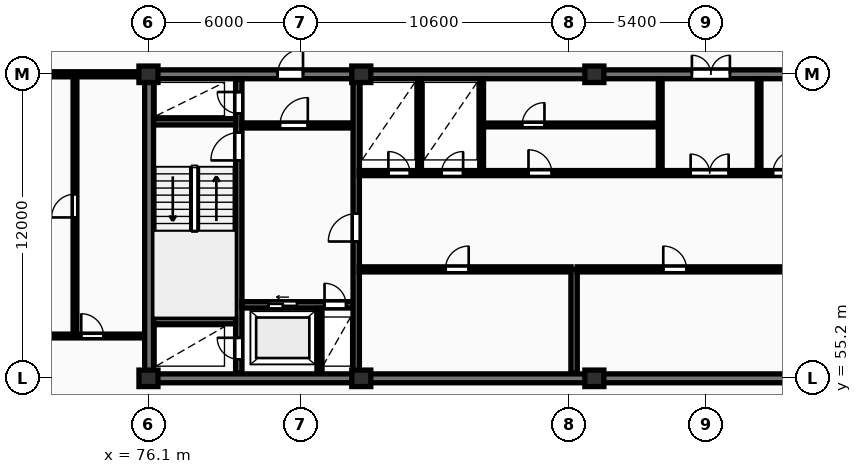
"""IFC4 building model, lengths in metres.
Left out: names, types, materials, properties, quantities, classifications, styles, units other than length and angle.
Written with IfcOpenShell. Run it as: python <this file> out.ifc"""

import sys

from ifc_helpers import new_model, si_unit, direction, frame, frame_2d, origin, origin_2d, place, context, subcontext, project, spatial, rectangle, extrude, element, fill, save


model = new_model("IFC4")
c1 = context("Model", 3, precision=1e-05, world=origin(), true_north=direction((0.0, 1.0)))
c2 = subcontext(c1, "Body", "Model", "MODEL_VIEW")
j1 = project(units=[si_unit("LENGTHUNIT", "METRE"), si_unit("PLANEANGLEUNIT", "RADIAN")], contexts=[c1])
p1 = place(None, origin())
s1 = spatial("IfcSite", under=j1, at=p1, CompositionType="ELEMENT")
p2 = place(p1, origin())
s2 = spatial("IfcBuilding", under=s1, at=p2, CompositionType="ELEMENT")
p3 = place(p2, frame((0.0, 0.0, 235.55)))
s3 = spatial("IfcBuildingStorey", under=s2, at=p3, CompositionType="ELEMENT", Elevation=235.55)
for number, where, z_axis, x_axis in (
    (1, (76.1, 55.2, 0.0), (0.0, 0.0, 1.0), (1.0, 0.0, 0.0)),
    (2, (76.1, 67.2, 0.0), (0.0, 0.0, 1.0), (1.0, 0.0, 0.0)),
    (3, (84.5, 55.2, 0.0), (0.0, 0.0, 1.0), (1.0, 0.0, 0.0)),
    (4, (84.5, 67.2, 0.0), (0.0, 0.0, 1.0), (1.0, 0.0, 0.0)),
    (5, (93.7, 55.2, 0.0), (0.0, 0.0, 1.0), (1.0, 0.0, 0.0)),
    (6, (93.7, 67.2, 0.0), (0.0, 0.0, 1.0), (1.0, 0.0, 0.0)),
):
    element("IfcColumn", number, at=place(p3, frame(where, z_axis=z_axis, x_axis=x_axis)), inside=s3, PredefinedType="COLUMN", context=c2, shape_type="SweptSolid", body=[
        extrude(rectangle(XDim=0.75, YDim=0.65, at=origin_2d()), origin(), (0.0, 0.0, 1.0), 3.45),
    ])
p4 = place(p3, frame((75.95, 55.2, 0.0), z_axis=(0.0, 0.0, 1.0), x_axis=(1.0, 0.0, 0.0)))
e7 = element("IfcWall", 7, at=p4, inside=s3, PredefinedType="SHEAR", context=c2, shape_type="SweptSolid", body=[
    extrude(rectangle(XDim=36.3, YDim=0.35, at=frame_2d((18.15, 0.0))), origin(), (0.0, 0.0, 1.0), 3.45),
])
p5 = place(p3, frame((76.125, 55.375, 0.0), z_axis=(0.0, 0.0, 1.0), x_axis=(0.0, 1.0, 0.0)))
e8 = element("IfcWall", 8, at=p5, inside=s3, PredefinedType="SHEAR", context=c2, shape_type="SweptSolid", body=[
    extrude(rectangle(XDim=11.65, YDim=0.35, at=frame_2d((5.825, 0.0))), origin(), (0.0, 0.0, 1.0), 3.45),
])
p6 = place(p3, frame((75.95, 67.2, 0.0), z_axis=(0.0, 0.0, 1.0), x_axis=(1.0, 0.0, 0.0)))
e9 = element("IfcWall", 9, at=p6, inside=s3, PredefinedType="SHEAR", context=c2, shape_type="SweptSolid", body=[
    extrude(rectangle(XDim=36.3, YDim=0.35, at=frame_2d((18.15, 0.0))), origin(), (0.0, 0.0, 1.0), 3.45),
])
p7 = place(p6, frame((5.25, 0.0, 0.0)))
e10 = element("IfcOpeningElement", 10, at=p7, cuts=e9, PredefinedType="OPENING", context=c2, shape_type="SweptSolid", body=[
    extrude(rectangle(XDim=1.0, YDim=2.15, at=frame_2d((0.5, 1.075))), frame((0.0, 0.185, 0.0), z_axis=(0.0, -1.0, 0.0), x_axis=(1.0, 0.0, 0.0)), (0.0, 0.0, 1.0), 0.37),
])
p8 = place(p6, frame((21.6, 0.0, 0.0)))
e11 = element("IfcOpeningElement", 11, at=p8, cuts=e9, PredefinedType="OPENING", context=c2, shape_type="SweptSolid", body=[
    extrude(rectangle(XDim=1.5, YDim=2.2, at=frame_2d((0.75, 1.1))), frame((0.0, 0.185, 0.0), z_axis=(0.0, -1.0, 0.0), x_axis=(1.0, 0.0, 0.0)), (0.0, 0.0, 1.0), 0.37),
])
p9 = place(p6, frame((30.45, 0.0, 0.0)))
e12 = element("IfcOpeningElement", 12, at=p9, cuts=e9, PredefinedType="OPENING", context=c2, shape_type="SweptSolid", body=[
    extrude(rectangle(XDim=1.0, YDim=2.15, at=frame_2d((0.5, 1.075))), frame((0.0, 0.185, 0.0), z_axis=(0.0, -1.0, 0.0), x_axis=(1.0, 0.0, 0.0)), (0.0, 0.0, 1.0), 0.37),
])
p10 = place(p3, frame((79.665, 55.4, 0.0), z_axis=(0.0, 0.0, 1.0), x_axis=(0.0, 1.0, 0.0)))
e13 = element("IfcWall", 13, at=p10, inside=s3, PredefinedType="SHEAR", context=c2, shape_type="SweptSolid", body=[
    extrude(rectangle(XDim=11.6, YDim=0.25, at=frame_2d((5.8, 0.0))), origin(), (0.0, 0.0, 1.0), 3.45),
])
p11 = place(p10, frame((0.55, 0.0, 0.0)))
e14 = element("IfcOpeningElement", 14, at=p11, cuts=e13, PredefinedType="OPENING", context=c2, shape_type="SweptSolid", body=[
    extrude(rectangle(XDim=0.85, YDim=2.05, at=frame_2d((0.425, 1.025))), frame((0.0, 0.135, 0.0), z_axis=(0.0, -1.0, 0.0), x_axis=(1.0, 0.0, 0.0)), (0.0, 0.0, 1.0), 0.27),
])
p12 = place(p10, frame((8.4, 0.0, 0.0)))
e15 = element("IfcOpeningElement", 15, at=p12, cuts=e13, PredefinedType="OPENING", context=c2, shape_type="SweptSolid", body=[
    extrude(rectangle(XDim=1.1, YDim=2.1, at=frame_2d((0.55, 1.05))), frame((0.0, 0.135, 0.0), z_axis=(0.0, -1.0, 0.0), x_axis=(1.0, 0.0, 0.0)), (0.0, 0.0, 1.0), 0.27),
])
p13 = place(p10, frame((10.25, 0.0, 0.0)))
e16 = element("IfcOpeningElement", 16, at=p13, cuts=e13, PredefinedType="OPENING", context=c2, shape_type="SweptSolid", body=[
    extrude(rectangle(XDim=0.85, YDim=2.05, at=frame_2d((0.425, 1.025))), frame((0.0, 0.135, 0.0), z_axis=(0.0, -1.0, 0.0), x_axis=(1.0, 0.0, 0.0)), (0.0, 0.0, 1.0), 0.27),
])
for number, where, z_axis, x_axis in (
    (17, (76.3, 57.475, 0.0), (0.0, 0.0, 1.0), (1.0, 0.0, 0.0)),
    (18, (76.3, 65.325, 0.0), (0.0, 0.0, 1.0), (1.0, 0.0, 0.0)),
):
    element("IfcWall", number, at=place(p3, frame(where, z_axis=z_axis, x_axis=x_axis)), inside=s3, PredefinedType="SHEAR", context=c2, shape_type="SweptSolid", body=[
        extrude(rectangle(XDim=3.24, YDim=0.25, at=frame_2d((1.62, 0.0))), origin(), (0.0, 0.0, 1.0), 3.45),
    ])
p14 = place(p3, frame((79.79, 58.1, 0.0), z_axis=(0.0, 0.0, 1.0), x_axis=(1.0, 0.0, 0.0)))
e19 = element("IfcWall", 19, at=p14, inside=s3, PredefinedType="SHEAR", context=c2, shape_type="SweptSolid", body=[
    extrude(rectangle(XDim=4.39, YDim=0.25, at=frame_2d((2.195, 0.0))), origin(), (0.0, 0.0, 1.0), 3.45),
])
p15 = place(p14, frame((1.05, 0.0, 0.0)))
e20 = element("IfcOpeningElement", 20, at=p15, cuts=e19, PredefinedType="OPENING", context=c2, shape_type="SweptSolid", body=[
    extrude(rectangle(XDim=1.12, YDim=2.12, at=frame_2d((0.56, 1.06))), frame((0.0, 0.135, 0.0), z_axis=(0.0, -1.0, 0.0), x_axis=(1.0, 0.0, 0.0)), (0.0, 0.0, 1.0), 0.27),
])
p16 = place(p14, frame((3.26, 0.0, 0.0)))
e21 = element("IfcOpeningElement", 21, at=p16, cuts=e19, PredefinedType="OPENING", context=c2, shape_type="SweptSolid", body=[
    extrude(rectangle(XDim=0.85, YDim=2.05, at=frame_2d((0.425, 1.025))), frame((0.0, 0.135, 0.0), z_axis=(0.0, -1.0, 0.0), x_axis=(1.0, 0.0, 0.0)), (0.0, 0.0, 1.0), 0.27),
])
p17 = place(p3, frame((82.85, 55.4, 0.0), z_axis=(0.0, 0.0, 1.0), x_axis=(0.0, 1.0, 0.0)))
e22 = element("IfcWall", 22, at=p17, inside=s3, PredefinedType="PARTITIONING", context=c2, shape_type="SweptSolid", body=[
    extrude(rectangle(XDim=2.56, YDim=0.2, at=frame_2d((1.28, 0.0))), origin(), (0.0, 0.0, 1.0), 3.17),
])
p18 = place(p3, frame((79.79, 65.18, 0.0), z_axis=(0.0, 0.0, 1.0), x_axis=(1.0, 0.0, 0.0)))
e23 = element("IfcWall", 23, at=p18, inside=s3, PredefinedType="PARTITIONING", context=c2, shape_type="SweptSolid", body=[
    extrude(rectangle(XDim=4.39, YDim=0.2, at=frame_2d((2.195, 0.0))), origin(), (0.0, 0.0, 1.0), 3.17),
])
p19 = place(p18, frame((1.5, 0.0, 0.0)))
e24 = element("IfcOpeningElement", 24, at=p19, cuts=e23, PredefinedType="OPENING", context=c2, shape_type="SweptSolid", body=[
    extrude(rectangle(XDim=1.1, YDim=2.1, at=frame_2d((0.55, 1.05))), frame((0.0, 0.11, 0.0), z_axis=(0.0, -1.0, 0.0), x_axis=(1.0, 0.0, 0.0)), (0.0, 0.0, 1.0), 0.22),
])
p20 = place(p3, frame((84.3, 55.4, 0.0), z_axis=(0.0, 0.0, 1.0), x_axis=(0.0, 1.0, 0.0)))
e25 = element("IfcWall", 25, at=p20, inside=s3, PredefinedType="SHEAR", context=c2, shape_type="SweptSolid", body=[
    extrude(rectangle(XDim=11.6, YDim=0.25, at=frame_2d((5.8, 0.0))), origin(), (0.0, 0.0, 1.0), 3.45),
])
p21 = place(p20, frame((5.2, 0.0, 0.0)))
e26 = element("IfcOpeningElement", 26, at=p21, cuts=e25, PredefinedType="OPENING", context=c2, shape_type="SweptSolid", body=[
    extrude(rectangle(XDim=1.1, YDim=2.1, at=frame_2d((0.55, 1.05))), frame((0.0, 0.135, 0.0), z_axis=(0.0, -1.0, 0.0), x_axis=(1.0, 0.0, 0.0)), (0.0, 0.0, 1.0), 0.27),
])
p22 = place(p3, frame((84.42, 59.5, 0.0), z_axis=(0.0, 0.0, 1.0), x_axis=(1.0, 0.0, 0.0)))
e27 = element("IfcWall", 27, at=p22, inside=s3, PredefinedType="PARTITIONING", context=c2, shape_type="SweptSolid", body=[
    extrude(rectangle(XDim=8.36, YDim=0.2, at=frame_2d((4.18, 0.0))), origin(), (0.0, 0.0, 1.0), 3.17),
])
p23 = place(p22, frame((3.4, 0.0, 0.0)))
e28 = element("IfcOpeningElement", 28, at=p23, cuts=e27, PredefinedType="OPENING", context=c2, shape_type="SweptSolid", body=[
    extrude(rectangle(XDim=0.92, YDim=2.08, at=frame_2d((0.46, 1.04))), frame((0.0, 0.11, 0.0), z_axis=(0.0, -1.0, 0.0), x_axis=(1.0, 0.0, 0.0)), (0.0, 0.0, 1.0), 0.22),
])
p24 = place(p3, frame((92.9, 55.4, 0.0), z_axis=(0.0, 0.0, 1.0), x_axis=(0.0, 1.0, 0.0)))
e29 = element("IfcWall", 29, at=p24, inside=s3, PredefinedType="SHEAR", context=c2, shape_type="SweptSolid", body=[
    extrude(rectangle(XDim=4.1, YDim=0.25, at=frame_2d((2.05, 0.0))), origin(), (0.0, 0.0, 1.0), 3.45),
])
p25 = place(p3, frame((93.02, 59.5, 0.0), z_axis=(0.0, 0.0, 1.0), x_axis=(1.0, 0.0, 0.0)))
e30 = element("IfcWall", 30, at=p25, inside=s3, PredefinedType="PARTITIONING", context=c2, shape_type="SweptSolid", body=[
    extrude(rectangle(XDim=8.36, YDim=0.2, at=frame_2d((4.18, 0.0))), origin(), (0.0, 0.0, 1.0), 3.17),
])
p26 = place(p25, frame((3.4, 0.0, 0.0)))
e31 = element("IfcOpeningElement", 31, at=p26, cuts=e30, PredefinedType="OPENING", context=c2, shape_type="SweptSolid", body=[
    extrude(rectangle(XDim=0.92, YDim=2.08, at=frame_2d((0.46, 1.04))), frame((0.0, 0.11, 0.0), z_axis=(0.0, -1.0, 0.0), x_axis=(1.0, 0.0, 0.0)), (0.0, 0.0, 1.0), 0.22),
])
for number, where, z_axis, x_axis in (
    (32, (86.8, 63.4, 0.0), (0.0, 0.0, 1.0), (0.0, 1.0, 0.0)),
    (33, (89.25, 63.4, 0.0), (0.0, 0.0, 1.0), (0.0, 1.0, 0.0)),
):
    element("IfcWall", number, at=place(p3, frame(where, z_axis=z_axis, x_axis=x_axis)), inside=s3, PredefinedType="PARTITIONING", context=c2, shape_type="SweptSolid", body=[
        extrude(rectangle(XDim=3.6, YDim=0.15, at=frame_2d((1.8, 0.0))), origin(), (0.0, 0.0, 1.0), 3.17),
    ])
p27 = place(p3, frame((89.25, 65.2, 0.0), z_axis=(0.0, 0.0, 1.0), x_axis=(1.0, 0.0, 0.0)))
e34 = element("IfcWall", 34, at=p27, inside=s3, PredefinedType="PARTITIONING", context=c2, shape_type="SweptSolid", body=[
    extrude(rectangle(XDim=7.05, YDim=0.15, at=frame_2d((3.525, 0.0))), origin(), (0.0, 0.0, 1.0), 3.17),
])
p28 = place(p27, frame((1.6, 0.0, 0.0)))
e35 = element("IfcOpeningElement", 35, at=p28, cuts=e34, PredefinedType="OPENING", context=c2, shape_type="SweptSolid", body=[
    extrude(rectangle(XDim=0.88, YDim=2.06, at=frame_2d((0.44, 1.03))), frame((0.0, 0.085, 0.0), z_axis=(0.0, -1.0, 0.0), x_axis=(1.0, 0.0, 0.0)), (0.0, 0.0, 1.0), 0.17),
])
for number, where, z_axis, x_axis in (
    (36, (96.3, 63.4, 0.0), (0.0, 0.0, 1.0), (0.0, 1.0, 0.0)),
    (37, (100.2, 63.4, 0.0), (0.0, 0.0, 1.0), (0.0, 1.0, 0.0)),
):
    element("IfcWall", number, at=place(p3, frame(where, z_axis=z_axis, x_axis=x_axis)), inside=s3, PredefinedType="PARTITIONING", context=c2, shape_type="SweptSolid", body=[
        extrude(rectangle(XDim=3.6, YDim=0.15, at=frame_2d((1.8, 0.0))), origin(), (0.0, 0.0, 1.0), 3.17),
    ])
p29 = place(p3, frame((84.42, 63.3, 0.0), z_axis=(0.0, 0.0, 1.0), x_axis=(1.0, 0.0, 0.0)))
e38 = element("IfcWall", 38, at=p29, inside=s3, PredefinedType="PARTITIONING", context=c2, shape_type="SweptSolid", body=[
    extrude(rectangle(XDim=19.83, YDim=0.2, at=frame_2d((9.915, 0.0))), origin(), (0.0, 0.0, 1.0), 3.17),
])
p30 = place(p29, frame((1.15, 0.0, 0.0)))
e39 = element("IfcOpeningElement", 39, at=p30, cuts=e38, PredefinedType="OPENING", context=c2, shape_type="SweptSolid", body=[
    extrude(rectangle(XDim=0.85, YDim=2.05, at=frame_2d((0.425, 1.025))), frame((0.0, 0.11, 0.0), z_axis=(0.0, -1.0, 0.0), x_axis=(1.0, 0.0, 0.0)), (0.0, 0.0, 1.0), 0.22),
])
p31 = place(p29, frame((3.25, 0.0, 0.0)))
e40 = element("IfcOpeningElement", 40, at=p31, cuts=e38, PredefinedType="OPENING", context=c2, shape_type="SweptSolid", body=[
    extrude(rectangle(XDim=0.85, YDim=2.05, at=frame_2d((0.425, 1.025))), frame((0.0, 0.11, 0.0), z_axis=(0.0, -1.0, 0.0), x_axis=(1.0, 0.0, 0.0)), (0.0, 0.0, 1.0), 0.22),
])
p32 = place(p29, frame((13.08, 0.0, 0.0)))
e41 = element("IfcOpeningElement", 41, at=p32, cuts=e38, PredefinedType="OPENING", context=c2, shape_type="SweptSolid", body=[
    extrude(rectangle(XDim=1.5, YDim=2.2, at=frame_2d((0.75, 1.1))), frame((0.0, 0.11, 0.0), z_axis=(0.0, -1.0, 0.0), x_axis=(1.0, 0.0, 0.0)), (0.0, 0.0, 1.0), 0.22),
])
p33 = place(p29, frame((6.68, 0.0, 0.0)))
e42 = element("IfcOpeningElement", 42, at=p33, cuts=e38, PredefinedType="OPENING", context=c2, shape_type="SweptSolid", body=[
    extrude(rectangle(XDim=0.92, YDim=2.08, at=frame_2d((0.46, 1.04))), frame((0.0, 0.11, 0.0), z_axis=(0.0, -1.0, 0.0), x_axis=(1.0, 0.0, 0.0)), (0.0, 0.0, 1.0), 0.22),
])
p34 = place(p29, frame((16.33, 0.0, 0.0)))
e43 = element("IfcOpeningElement", 43, at=p34, cuts=e38, PredefinedType="OPENING", context=c2, shape_type="SweptSolid", body=[
    extrude(rectangle(XDim=0.88, YDim=2.06, at=frame_2d((0.44, 1.03))), frame((0.0, 0.11, 0.0), z_axis=(0.0, -1.0, 0.0), x_axis=(1.0, 0.0, 0.0)), (0.0, 0.0, 1.0), 0.22),
])
p35 = place(p3, frame((73.2, 56.87, 0.0), z_axis=(0.0, 0.0, 1.0), x_axis=(0.0, 1.0, 0.0)))
e44 = element("IfcWall", 44, at=p35, inside=s3, PredefinedType="PARTITIONING", context=c2, shape_type="SweptSolid", body=[
    extrude(rectangle(XDim=10.28, YDim=0.15, at=frame_2d((5.14, 0.0))), origin(), (0.0, 0.0, 1.0), 3.17),
])
p36 = place(p35, frame((4.68, 0.0, 0.0)))
e45 = element("IfcOpeningElement", 45, at=p36, cuts=e44, PredefinedType="OPENING", context=c2, shape_type="SweptSolid", body=[
    extrude(rectangle(XDim=0.92, YDim=2.08, at=frame_2d((0.46, 1.04))), frame((0.0, 0.085, 0.0), z_axis=(0.0, -1.0, 0.0), x_axis=(1.0, 0.0, 0.0)), (0.0, 0.0, 1.0), 0.17),
])
p37 = place(p3, frame((69.17, 56.87, 0.0), z_axis=(0.0, 0.0, 1.0), x_axis=(1.0, 0.0, 0.0)))
e46 = element("IfcWall", 46, at=p37, inside=s3, PredefinedType="PARTITIONING", context=c2, shape_type="SweptSolid", body=[
    extrude(rectangle(XDim=6.76, YDim=0.15, at=frame_2d((3.38, 0.0))), origin(), (0.0, 0.0, 1.0), 3.17),
])
p38 = place(p37, frame((1.362, 0.0, 0.0)))
e47 = element("IfcOpeningElement", 47, at=p38, cuts=e46, PredefinedType="OPENING", context=c2, shape_type="SweptSolid", body=[
    extrude(rectangle(XDim=0.84, YDim=2.04, at=frame_2d((0.42, 1.02))), frame((0.0, 0.085, 0.0), z_axis=(0.0, -1.0, 0.0), x_axis=(1.0, 0.0, 0.0)), (0.0, 0.0, 1.0), 0.17),
])
p39 = place(p37, frame((4.277, 0.0, 0.0)))
e48 = element("IfcOpeningElement", 48, at=p39, cuts=e46, PredefinedType="OPENING", context=c2, shape_type="SweptSolid", body=[
    extrude(rectangle(XDim=0.88, YDim=2.06, at=frame_2d((0.44, 1.03))), frame((0.0, 0.085, 0.0), z_axis=(0.0, -1.0, 0.0), x_axis=(1.0, 0.0, 0.0)), (0.0, 0.0, 1.0), 0.17),
])
p40 = place(p3, frame((59.8, 67.2, 0.0), z_axis=(0.0, 0.0, 1.0), x_axis=(1.0, 0.0, 0.0)))
e49 = element("IfcWall", 49, at=p40, inside=s3, PredefinedType="PARTITIONING", context=c2, shape_type="SweptSolid", body=[
    extrude(rectangle(XDim=16.15, YDim=0.2, at=frame_2d((8.075, 0.0))), origin(), (0.0, 0.0, 1.0), 2.633),
])
p41 = place(p40, frame((9.772, 0.0, 0.0)))
e50 = element("IfcOpeningElement", 50, at=p41, cuts=e49, PredefinedType="OPENING", context=c2, shape_type="SweptSolid", body=[
    extrude(rectangle(XDim=0.95, YDim=2.15, at=frame_2d((0.475, 1.075))), frame((0.0, 0.11, 0.0), z_axis=(0.0, -1.0, 0.0), x_axis=(1.0, 0.0, 0.0)), (0.0, 0.0, 1.0), 0.22),
])
p42 = place(p7, origin())
e51 = element("IfcDoor", 51, at=p42, inside=s3, OperationType="SINGLE_SWING_RIGHT", PredefinedType="DOOR", context=c2, shape_type="SweptSolid", body=[
    extrude(rectangle(XDim=1.0, YDim=2.15, at=frame_2d((0.5, 1.075))), frame((0.0, 0.025, 0.0), z_axis=(0.0, -1.0, 0.0), x_axis=(1.0, 0.0, 0.0)), (0.0, 0.0, 1.0), 0.05),
])
fill(e10, e51)
p43 = place(p8, origin())
e52 = element("IfcDoor", 52, at=p43, inside=s3, OperationType="DOUBLE_DOOR_SINGLE_SWING", PredefinedType="DOOR", context=c2, shape_type="SweptSolid", body=[
    extrude(rectangle(XDim=1.5, YDim=2.2, at=frame_2d((0.75, 1.1))), frame((0.0, 0.025, 0.0), z_axis=(0.0, -1.0, 0.0), x_axis=(1.0, 0.0, 0.0)), (0.0, 0.0, 1.0), 0.05),
])
fill(e11, e52)
p44 = place(p11, origin())
e53 = element("IfcDoor", 53, at=p44, inside=s3, OperationType="SINGLE_SWING_RIGHT", PredefinedType="DOOR", context=c2, shape_type="SweptSolid", body=[
    extrude(rectangle(XDim=0.85, YDim=2.05, at=frame_2d((0.425, 1.025))), frame((0.0, 0.025, 0.0), z_axis=(0.0, -1.0, 0.0), x_axis=(1.0, 0.0, 0.0)), (0.0, 0.0, 1.0), 0.05),
])
fill(e14, e53)
p45 = place(p12, origin())
e54 = element("IfcDoor", 54, at=p45, inside=s3, OperationType="SINGLE_SWING_LEFT", PredefinedType="DOOR", context=c2, shape_type="SweptSolid", body=[
    extrude(rectangle(XDim=1.1, YDim=2.1, at=frame_2d((0.55, 1.05))), frame((0.0, 0.025, 0.0), z_axis=(0.0, -1.0, 0.0), x_axis=(1.0, 0.0, 0.0)), (0.0, 0.0, 1.0), 0.05),
])
fill(e15, e54)
p46 = place(p13, origin())
e55 = element("IfcDoor", 55, at=p46, inside=s3, OperationType="SINGLE_SWING_RIGHT", PredefinedType="DOOR", context=c2, shape_type="SweptSolid", body=[
    extrude(rectangle(XDim=0.85, YDim=2.05, at=frame_2d((0.425, 1.025))), frame((0.0, 0.025, 0.0), z_axis=(0.0, -1.0, 0.0), x_axis=(1.0, 0.0, 0.0)), (0.0, 0.0, 1.0), 0.05),
])
fill(e16, e55)
p47 = place(p15, origin())
e56 = element("IfcDoor", 56, at=p47, inside=s3, OperationType="SLIDING_TO_LEFT", PredefinedType="DOOR", context=c2, shape_type="SweptSolid", body=[
    extrude(rectangle(XDim=1.12, YDim=2.12, at=frame_2d((0.56, 1.06))), frame((0.0, 0.025, 0.0), z_axis=(0.0, -1.0, 0.0), x_axis=(1.0, 0.0, 0.0)), (0.0, 0.0, 1.0), 0.05),
])
fill(e20, e56)
p48 = place(p16, origin())
e57 = element("IfcDoor", 57, at=p48, inside=s3, OperationType="SINGLE_SWING_LEFT", PredefinedType="DOOR", context=c2, shape_type="SweptSolid", body=[
    extrude(rectangle(XDim=0.85, YDim=2.05, at=frame_2d((0.425, 1.025))), frame((0.0, 0.025, 0.0), z_axis=(0.0, -1.0, 0.0), x_axis=(1.0, 0.0, 0.0)), (0.0, 0.0, 1.0), 0.05),
])
fill(e21, e57)
p49 = place(p19, origin())
e58 = element("IfcDoor", 58, at=p49, inside=s3, OperationType="SINGLE_SWING_RIGHT", PredefinedType="DOOR", context=c2, shape_type="SweptSolid", body=[
    extrude(rectangle(XDim=1.1, YDim=2.1, at=frame_2d((0.55, 1.05))), frame((0.0, 0.025, 0.0), z_axis=(0.0, -1.0, 0.0), x_axis=(1.0, 0.0, 0.0)), (0.0, 0.0, 1.0), 0.05),
])
fill(e24, e58)
p50 = place(p21, origin())
e59 = element("IfcDoor", 59, at=p50, inside=s3, OperationType="SINGLE_SWING_LEFT", PredefinedType="DOOR", context=c2, shape_type="SweptSolid", body=[
    extrude(rectangle(XDim=1.1, YDim=2.1, at=frame_2d((0.55, 1.05))), frame((0.0, 0.025, 0.0), z_axis=(0.0, -1.0, 0.0), x_axis=(1.0, 0.0, 0.0)), (0.0, 0.0, 1.0), 0.05),
])
fill(e26, e59)
p51 = place(p23, origin())
e60 = element("IfcDoor", 60, at=p51, inside=s3, OperationType="SINGLE_SWING_RIGHT", PredefinedType="DOOR", context=c2, shape_type="SweptSolid", body=[
    extrude(rectangle(XDim=0.92, YDim=2.08, at=frame_2d((0.46, 1.04))), frame((0.0, 0.025, 0.0), z_axis=(0.0, -1.0, 0.0), x_axis=(1.0, 0.0, 0.0)), (0.0, 0.0, 1.0), 0.05),
])
fill(e28, e60)
p52 = place(p26, origin())
e61 = element("IfcDoor", 61, at=p52, inside=s3, OperationType="SINGLE_SWING_LEFT", PredefinedType="DOOR", context=c2, shape_type="SweptSolid", body=[
    extrude(rectangle(XDim=0.92, YDim=2.08, at=frame_2d((0.46, 1.04))), frame((0.0, 0.025, 0.0), z_axis=(0.0, -1.0, 0.0), x_axis=(1.0, 0.0, 0.0)), (0.0, 0.0, 1.0), 0.05),
])
fill(e31, e61)
p53 = place(p28, origin())
e62 = element("IfcDoor", 62, at=p53, inside=s3, OperationType="SINGLE_SWING_RIGHT", PredefinedType="DOOR", context=c2, shape_type="SweptSolid", body=[
    extrude(rectangle(XDim=0.88, YDim=2.06, at=frame_2d((0.44, 1.03))), frame((0.0, 0.025, 0.0), z_axis=(0.0, -1.0, 0.0), x_axis=(1.0, 0.0, 0.0)), (0.0, 0.0, 1.0), 0.05),
])
fill(e35, e62)
p54 = place(p30, origin())
e63 = element("IfcDoor", 63, at=p54, inside=s3, OperationType="SINGLE_SWING_LEFT", PredefinedType="DOOR", context=c2, shape_type="SweptSolid", body=[
    extrude(rectangle(XDim=0.85, YDim=2.05, at=frame_2d((0.425, 1.025))), frame((0.0, 0.025, 0.0), z_axis=(0.0, -1.0, 0.0), x_axis=(1.0, 0.0, 0.0)), (0.0, 0.0, 1.0), 0.05),
])
fill(e39, e63)
p55 = place(p31, origin())
e64 = element("IfcDoor", 64, at=p55, inside=s3, OperationType="SINGLE_SWING_RIGHT", PredefinedType="DOOR", context=c2, shape_type="SweptSolid", body=[
    extrude(rectangle(XDim=0.85, YDim=2.05, at=frame_2d((0.425, 1.025))), frame((0.0, 0.025, 0.0), z_axis=(0.0, -1.0, 0.0), x_axis=(1.0, 0.0, 0.0)), (0.0, 0.0, 1.0), 0.05),
])
fill(e40, e64)
p56 = place(p32, origin())
e65 = element("IfcDoor", 65, at=p56, inside=s3, OperationType="DOUBLE_DOOR_SINGLE_SWING", PredefinedType="DOOR", context=c2, shape_type="SweptSolid", body=[
    extrude(rectangle(XDim=1.5, YDim=2.2, at=frame_2d((0.75, 1.1))), frame((0.0, 0.025, 0.0), z_axis=(0.0, -1.0, 0.0), x_axis=(1.0, 0.0, 0.0)), (0.0, 0.0, 1.0), 0.05),
])
fill(e41, e65)
p57 = place(p33, origin())
e66 = element("IfcDoor", 66, at=p57, inside=s3, OperationType="SINGLE_SWING_LEFT", PredefinedType="DOOR", context=c2, shape_type="SweptSolid", body=[
    extrude(rectangle(XDim=0.92, YDim=2.08, at=frame_2d((0.46, 1.04))), frame((0.0, 0.025, 0.0), z_axis=(0.0, -1.0, 0.0), x_axis=(1.0, 0.0, 0.0)), (0.0, 0.0, 1.0), 0.05),
])
fill(e42, e66)
p58 = place(p34, origin())
e67 = element("IfcDoor", 67, at=p58, inside=s3, OperationType="SINGLE_SWING_RIGHT", PredefinedType="DOOR", context=c2, shape_type="SweptSolid", body=[
    extrude(rectangle(XDim=0.88, YDim=2.06, at=frame_2d((0.44, 1.03))), frame((0.0, 0.025, 0.0), z_axis=(0.0, -1.0, 0.0), x_axis=(1.0, 0.0, 0.0)), (0.0, 0.0, 1.0), 0.05),
])
fill(e43, e67)
p59 = place(p36, origin())
e68 = element("IfcDoor", 68, at=p59, inside=s3, OperationType="SINGLE_SWING_LEFT", PredefinedType="DOOR", context=c2, shape_type="SweptSolid", body=[
    extrude(rectangle(XDim=0.92, YDim=2.08, at=frame_2d((0.46, 1.04))), frame((0.0, 0.025, 0.0), z_axis=(0.0, -1.0, 0.0), x_axis=(1.0, 0.0, 0.0)), (0.0, 0.0, 1.0), 0.05),
])
fill(e45, e68)
p60 = place(p39, origin())
e69 = element("IfcDoor", 69, at=p60, inside=s3, OperationType="SINGLE_SWING_LEFT", PredefinedType="DOOR", context=c2, shape_type="SweptSolid", body=[
    extrude(rectangle(XDim=0.88, YDim=2.06, at=frame_2d((0.44, 1.03))), frame((0.0, 0.025, 0.0), z_axis=(0.0, -1.0, 0.0), x_axis=(1.0, 0.0, 0.0)), (0.0, 0.0, 1.0), 0.05),
])
fill(e48, e69)
save(model, sys.argv[1])
